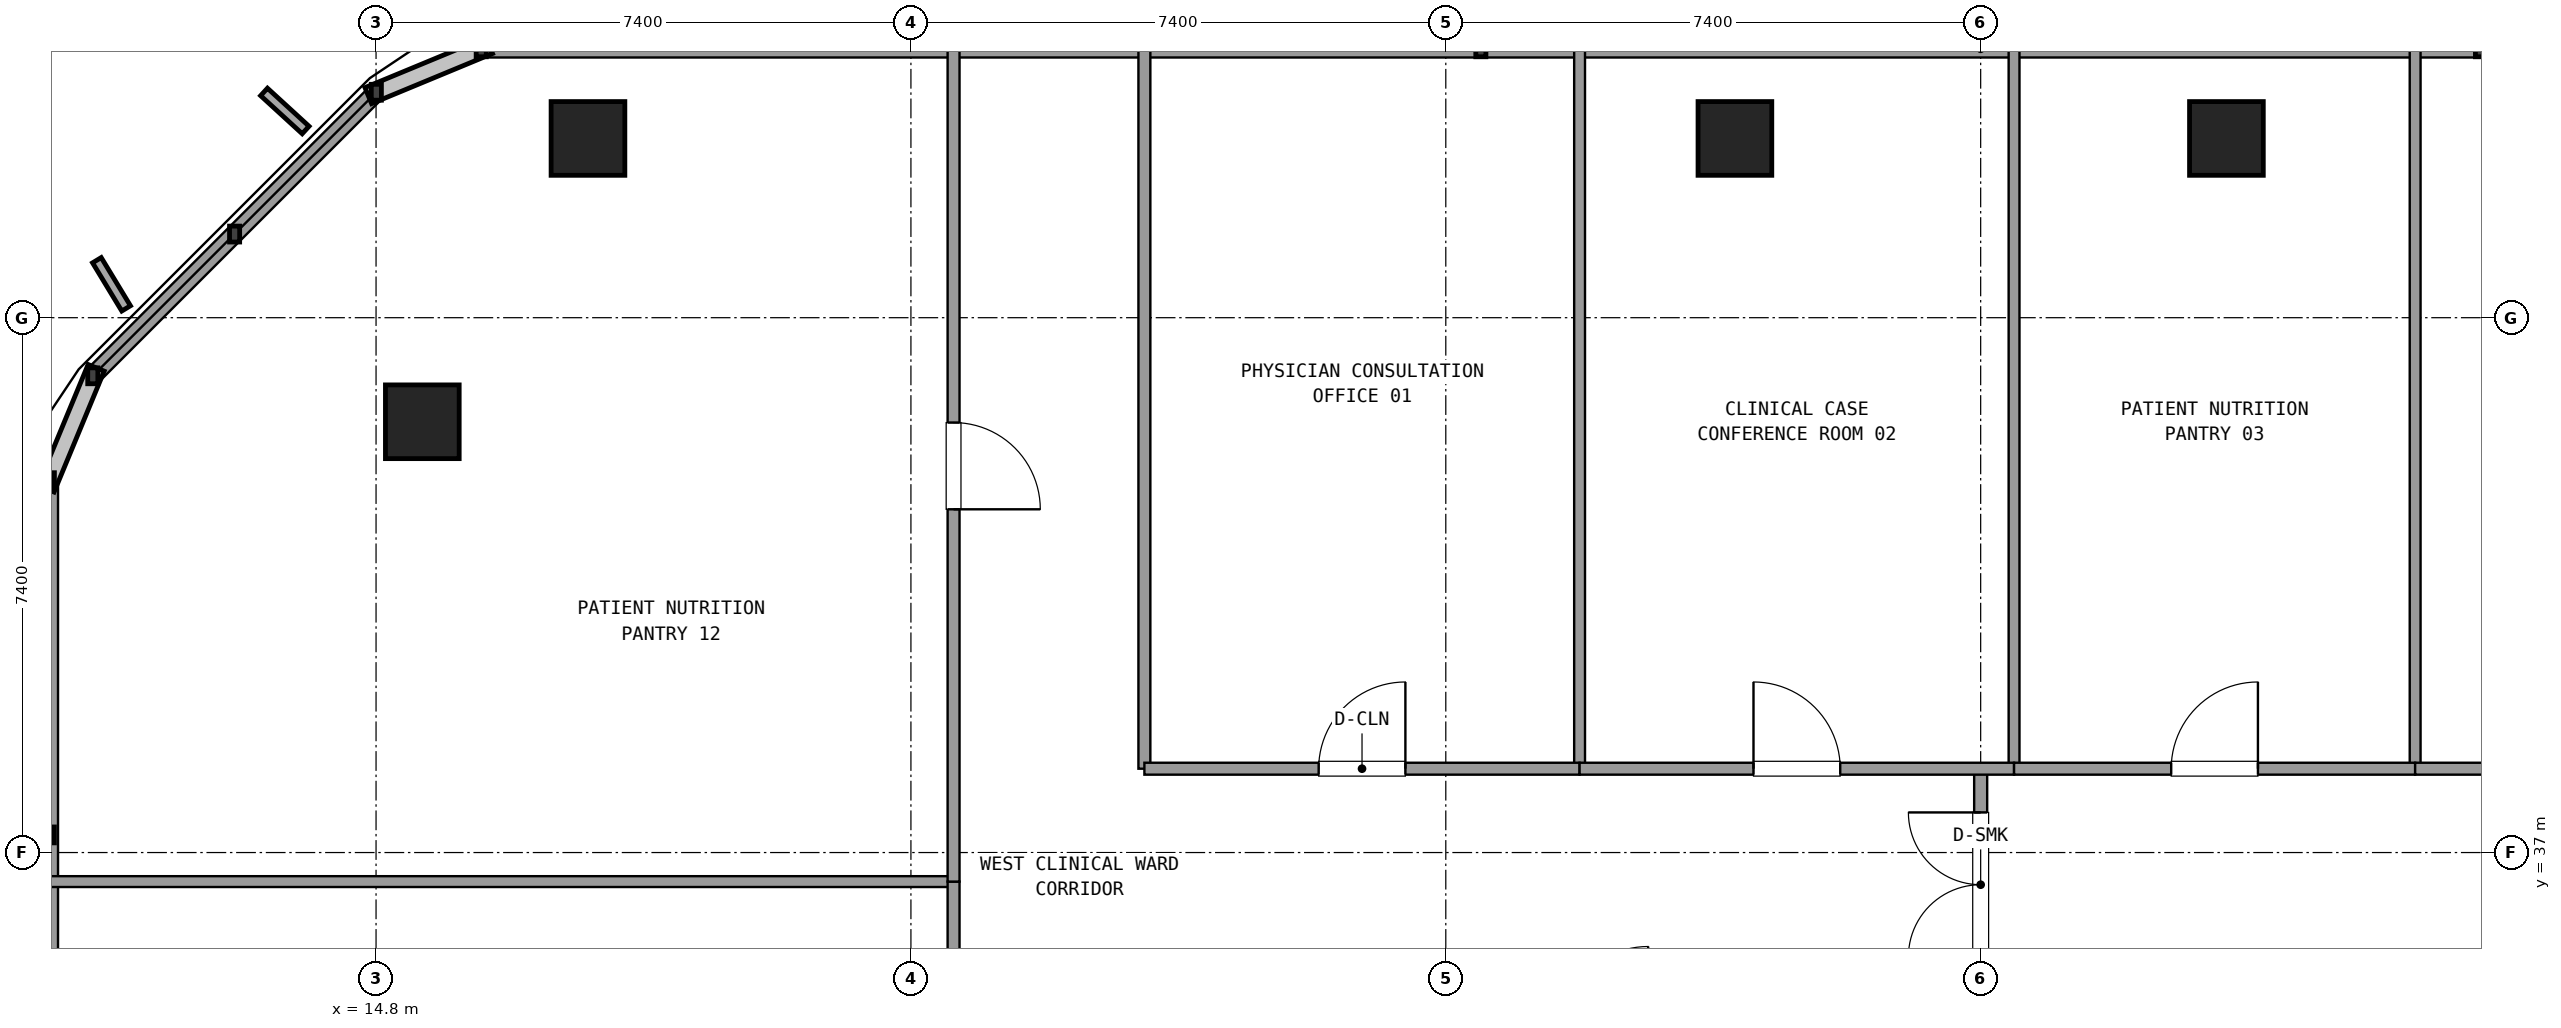
"""IFC4 building model, lengths in metres.
Left out: names, types, materials, properties, quantities, classifications, styles, units other than length and angle.
Written with IfcOpenShell. Run it as: python <this file> out.ifc"""

import sys

from ifc_helpers import new_model, si_unit, direction, frame, frame_2d, origin, origin_2d, place, context, subcontext, project, spatial, rectangle, extrude, element, fill, save


model = new_model("IFC4")
c1 = context("Model", 3, precision=1e-05, world=origin(), true_north=direction((0.0, 1.0)))
c2 = subcontext(c1, "Body", "Model", "MODEL_VIEW")
j1 = project(units=[si_unit("LENGTHUNIT", "METRE"), si_unit("PLANEANGLEUNIT", "RADIAN")], contexts=[c1])
p1 = place(None, origin())
s1 = spatial("IfcSite", under=j1, at=p1, CompositionType="ELEMENT")
p2 = place(p1, origin())
s2 = spatial("IfcBuilding", under=s1, at=p2, CompositionType="ELEMENT")
p3 = place(p2, frame((0.0, 0.0, 84.78)))
s3 = spatial("IfcBuildingStorey", under=s2, at=p3, CompositionType="ELEMENT", Elevation=84.78)
for number, where, z_axis, x_axis in (
    (1, (40.4, 46.88, 0.0), (0.0, 0.0, 1.0), (1.0, 0.0, 0.0)),
    (2, (33.6, 46.88, 0.0), (0.0, 0.0, 1.0), (1.0, 0.0, 0.0)),
):
    element("IfcColumn", number, at=place(p3, frame(where, z_axis=z_axis, x_axis=x_axis)), inside=s3, PredefinedType="COLUMN", context=c2, shape_type="SweptSolid", body=[
        extrude(rectangle(XDim=1.02, YDim=1.02, at=origin_2d()), origin(), (0.0, 0.0, 1.0), 3.579),
    ])
for number, where, z_axis, x_axis in (
    (3, (17.732, 46.88, 0.0), (0.0, 0.0, 1.0), (1.0, 0.0, 0.0)),
    (4, (15.44, 42.96, 0.0), (0.0, 0.0, 1.0), (1.0, 0.0, 0.0)),
):
    element("IfcColumn", number, at=place(p3, frame(where, z_axis=z_axis, x_axis=x_axis)), inside=s3, PredefinedType="COLUMN", context=c2, shape_type="SweptSolid", body=[
        extrude(rectangle(XDim=1.02, YDim=1.02, at=origin_2d()), origin(), (0.0, 0.0, 1.0), 3.577),
    ])
p4 = place(p3, frame((57.745, 48.12, 0.0), z_axis=(0.0, 0.0, 1.0), x_axis=(-1.0, 0.0, 0.0)))
e5 = element("IfcWall", 5, at=p4, inside=s3, PredefinedType="SOLIDWALL", context=c2, shape_type="SweptSolid", body=[
    extrude(rectangle(XDim=41.49, YDim=0.24, at=frame_2d((20.745, 0.0))), origin(), (0.0, 0.0, 1.0), 0.85),
])
p5 = place(p3, frame((14.804, 47.519, 0.0), z_axis=(0.0, 0.0, 1.0), x_axis=(-0.707084777957, -0.707128783731, 0.0)))
e6 = element("IfcWall", 6, at=p5, inside=s3, PredefinedType="SOLIDWALL", context=c2, shape_type="SweptSolid", body=[
    extrude(rectangle(XDim=5.548, YDim=0.24, at=frame_2d((2.774, 0.0))), origin(), (0.0, 0.0, 1.0), 0.85),
])
p6 = place(p3, frame((10.28, 42.145, 0.0), z_axis=(0.0, 0.0, 1.0), x_axis=(0.0, -1.0, 0.0)))
e7 = element("IfcWall", 7, at=p6, inside=s3, PredefinedType="SOLIDWALL", context=c2, shape_type="SweptSolid", body=[
    extrude(rectangle(XDim=14.704, YDim=0.24, at=frame_2d((7.352, 0.0))), origin(), (0.0, 0.0, 1.0), 0.85),
])
p7 = place(p3, frame((37.0, 34.95, 0.0), z_axis=(0.0, 0.0, 1.0), x_axis=(0.0, 1.0, 0.0)))
e8 = element("IfcWall", 8, at=p7, inside=s3, PredefinedType="PARTITIONING", context=c2, shape_type="SweptSolid", body=[
    extrude(rectangle(XDim=3.21, YDim=0.18, at=frame_2d((1.605, 0.0))), origin(), (0.0, 0.0, 1.0), 2.61),
])
p8 = place(p7, frame((0.605, 0.0, 0.0)))
e9 = element("IfcOpeningElement", 9, at=p8, cuts=e8, PredefinedType="OPENING", context=c2, shape_type="SweptSolid", body=[
    extrude(rectangle(XDim=2.0, YDim=2.2, at=frame_2d((1.0, 1.1))), frame((0.0, 0.1, 0.0), z_axis=(0.0, -1.0, 0.0), x_axis=(1.0, 0.0, 0.0)), (0.0, 0.0, 1.0), 0.2),
])
p9 = place(p3, frame((25.43, 38.16, 0.0), z_axis=(0.0, 0.0, 1.0), x_axis=(0.0, 1.0, 0.0)))
e10 = element("IfcWall", 10, at=p9, inside=s3, PredefinedType="PARTITIONING", context=c2, shape_type="SweptSolid", body=[
    extrude(rectangle(XDim=9.94, YDim=0.165, at=frame_2d((4.97, 0.0))), origin(), (0.0, 0.0, 1.0), 2.61),
])
p10 = place(p3, frame((31.451, 38.16, 0.0), z_axis=(0.0, 0.0, 1.0), x_axis=(0.0, 1.0, 0.0)))
e11 = element("IfcWall", 11, at=p10, inside=s3, PredefinedType="PARTITIONING", context=c2, shape_type="SweptSolid", body=[
    extrude(rectangle(XDim=9.94, YDim=0.15, at=frame_2d((4.97, 0.0))), origin(), (0.0, 0.0, 1.0), 2.61),
])
p11 = place(p3, frame((25.43, 38.16, 0.0), z_axis=(0.0, 0.0, 1.0), x_axis=(1.0, 0.0, 0.0)))
e12 = element("IfcWall", 12, at=p11, inside=s3, PredefinedType="PARTITIONING", context=c2, shape_type="SweptSolid", body=[
    extrude(rectangle(XDim=6.021, YDim=0.165, at=frame_2d((3.01, 0.0))), origin(), (0.0, 0.0, 1.0), 2.61),
])
p12 = place(p11, frame((2.411, 0.0, 0.0)))
e13 = element("IfcOpeningElement", 13, at=p12, cuts=e12, PredefinedType="OPENING", context=c2, shape_type="SweptSolid", body=[
    extrude(rectangle(XDim=1.2, YDim=2.15, at=frame_2d((0.6, 1.075))), frame((0.0, 0.093, 0.0), z_axis=(0.0, -1.0, 0.0), x_axis=(1.0, 0.0, 0.0)), (0.0, 0.0, 1.0), 0.185),
])
p13 = place(p3, frame((37.462, 38.16, 0.0), z_axis=(0.0, 0.0, 1.0), x_axis=(0.0, 1.0, 0.0)))
e14 = element("IfcWall", 14, at=p13, inside=s3, PredefinedType="PARTITIONING", context=c2, shape_type="SweptSolid", body=[
    extrude(rectangle(XDim=9.94, YDim=0.15, at=frame_2d((4.97, 0.0))), origin(), (0.0, 0.0, 1.0), 2.61),
])
p14 = place(p3, frame((31.451, 38.16, 0.0), z_axis=(0.0, 0.0, 1.0), x_axis=(1.0, 0.0, 0.0)))
e15 = element("IfcWall", 15, at=p14, inside=s3, PredefinedType="PARTITIONING", context=c2, shape_type="SweptSolid", body=[
    extrude(rectangle(XDim=6.011, YDim=0.165, at=frame_2d((3.005, 0.0))), origin(), (0.0, 0.0, 1.0), 2.61),
])
p15 = place(p14, frame((2.406, 0.0, 0.0)))
e16 = element("IfcOpeningElement", 16, at=p15, cuts=e15, PredefinedType="OPENING", context=c2, shape_type="SweptSolid", body=[
    extrude(rectangle(XDim=1.2, YDim=2.15, at=frame_2d((0.6, 1.075))), frame((0.0, 0.093, 0.0), z_axis=(0.0, -1.0, 0.0), x_axis=(1.0, 0.0, 0.0)), (0.0, 0.0, 1.0), 0.185),
])
p16 = place(p3, frame((43.011, 38.16, 0.0), z_axis=(0.0, 0.0, 1.0), x_axis=(0.0, 1.0, 0.0)))
e17 = element("IfcWall", 17, at=p16, inside=s3, PredefinedType="PARTITIONING", context=c2, shape_type="SweptSolid", body=[
    extrude(rectangle(XDim=9.94, YDim=0.15, at=frame_2d((4.97, 0.0))), origin(), (0.0, 0.0, 1.0), 2.61),
])
p17 = place(p3, frame((37.462, 38.16, 0.0), z_axis=(0.0, 0.0, 1.0), x_axis=(1.0, 0.0, 0.0)))
e18 = element("IfcWall", 18, at=p17, inside=s3, PredefinedType="PARTITIONING", context=c2, shape_type="SweptSolid", body=[
    extrude(rectangle(XDim=5.549, YDim=0.165, at=frame_2d((2.774, 0.0))), origin(), (0.0, 0.0, 1.0), 2.61),
])
p18 = place(p17, frame((2.174, 0.0, 0.0)))
e19 = element("IfcOpeningElement", 19, at=p18, cuts=e18, PredefinedType="OPENING", context=c2, shape_type="SweptSolid", body=[
    extrude(rectangle(XDim=1.2, YDim=2.15, at=frame_2d((0.6, 1.075))), frame((0.0, 0.093, 0.0), z_axis=(0.0, -1.0, 0.0), x_axis=(1.0, 0.0, 0.0)), (0.0, 0.0, 1.0), 0.185),
])
p19 = place(p3, frame((43.011, 38.16, 0.0), z_axis=(0.0, 0.0, 1.0), x_axis=(1.0, 0.0, 0.0)))
e20 = element("IfcWall", 20, at=p19, inside=s3, PredefinedType="PARTITIONING", context=c2, shape_type="SweptSolid", body=[
    extrude(rectangle(XDim=5.559, YDim=0.165, at=frame_2d((2.78, 0.0))), origin(), (0.0, 0.0, 1.0), 2.61),
])
p20 = place(p19, frame((2.179, 0.0, 0.0)))
e21 = element("IfcOpeningElement", 21, at=p20, cuts=e20, PredefinedType="OPENING", context=c2, shape_type="SweptSolid", body=[
    extrude(rectangle(XDim=1.2, YDim=2.15, at=frame_2d((0.6, 1.075))), frame((0.0, 0.093, 0.0), z_axis=(0.0, -1.0, 0.0), x_axis=(1.0, 0.0, 0.0)), (0.0, 0.0, 1.0), 0.185),
])
p21 = place(p3, frame((22.79, 36.598, 0.0), z_axis=(0.0, 0.0, 1.0), x_axis=(-1.0, 0.0, 0.0)))
e22 = element("IfcWall", 22, at=p21, inside=s3, PredefinedType="PARTITIONING", context=c2, shape_type="SweptSolid", body=[
    extrude(rectangle(XDim=12.49, YDim=0.15, at=frame_2d((6.245, 0.0))), origin(), (0.0, 0.0, 1.0), 2.61),
])
p22 = place(p3, frame((22.79, 27.56, 0.0), z_axis=(0.0, 0.0, 1.0), x_axis=(0.0, 1.0, 0.0)))
e23 = element("IfcWall", 23, at=p22, inside=s3, PredefinedType="PARTITIONING", context=c2, shape_type="SweptSolid", body=[
    extrude(rectangle(XDim=9.038, YDim=0.165, at=frame_2d((4.519, 0.0))), origin(), (0.0, 0.0, 1.0), 2.61),
])
p23 = place(p22, frame((3.919, 0.0, 0.0)))
e24 = element("IfcOpeningElement", 24, at=p23, cuts=e23, PredefinedType="OPENING", context=c2, shape_type="SweptSolid", body=[
    extrude(rectangle(XDim=1.2, YDim=2.15, at=frame_2d((0.6, 1.075))), frame((0.0, 0.093, 0.0), z_axis=(0.0, -1.0, 0.0), x_axis=(1.0, 0.0, 0.0)), (0.0, 0.0, 1.0), 0.185),
])
p24 = place(p3, frame((22.79, 36.598, 0.0), z_axis=(0.0, 0.0, 1.0), x_axis=(0.0, 1.0, 0.0)))
e25 = element("IfcWall", 25, at=p24, inside=s3, PredefinedType="PARTITIONING", context=c2, shape_type="SweptSolid", body=[
    extrude(rectangle(XDim=11.502, YDim=0.165, at=frame_2d((5.751, 0.0))), origin(), (0.0, 0.0, 1.0), 2.61),
])
p25 = place(p24, frame((5.151, 0.0, 0.0)))
e26 = element("IfcOpeningElement", 26, at=p25, cuts=e25, PredefinedType="OPENING", context=c2, shape_type="SweptSolid", body=[
    extrude(rectangle(XDim=1.2, YDim=2.15, at=frame_2d((0.6, 1.075))), frame((0.0, 0.093, 0.0), z_axis=(0.0, -1.0, 0.0), x_axis=(1.0, 0.0, 0.0)), (0.0, 0.0, 1.0), 0.185),
])
p26 = place(p8, origin())
e27 = element("IfcDoor", 27, at=p26, inside=s3, OperationType="DOUBLE_DOOR_SINGLE_SWING", PredefinedType="DOOR", context=c2, shape_type="SweptSolid", body=[
    extrude(rectangle(XDim=2.0, YDim=2.2, at=frame_2d((1.0, 1.1))), frame((0.0, 0.025, 0.0), z_axis=(0.0, -1.0, 0.0), x_axis=(1.0, 0.0, 0.0)), (0.0, 0.0, 1.0), 0.05),
])
fill(e9, e27)
p27 = place(p12, origin())
e28 = element("IfcDoor", 28, at=p27, inside=s3, OperationType="SINGLE_SWING_RIGHT", PredefinedType="DOOR", context=c2, shape_type="SweptSolid", body=[
    extrude(rectangle(XDim=1.2, YDim=2.15, at=frame_2d((0.6, 1.075))), frame((0.0, 0.025, 0.0), z_axis=(0.0, -1.0, 0.0), x_axis=(1.0, 0.0, 0.0)), (0.0, 0.0, 1.0), 0.05),
])
fill(e13, e28)
p28 = place(p15, origin())
e29 = element("IfcDoor", 29, at=p28, inside=s3, OperationType="SINGLE_SWING_LEFT", PredefinedType="DOOR", context=c2, shape_type="SweptSolid", body=[
    extrude(rectangle(XDim=1.2, YDim=2.15, at=frame_2d((0.6, 1.075))), frame((0.0, 0.025, 0.0), z_axis=(0.0, -1.0, 0.0), x_axis=(1.0, 0.0, 0.0)), (0.0, 0.0, 1.0), 0.05),
])
fill(e16, e29)
p29 = place(p18, origin())
e30 = element("IfcDoor", 30, at=p29, inside=s3, OperationType="SINGLE_SWING_RIGHT", PredefinedType="DOOR", context=c2, shape_type="SweptSolid", body=[
    extrude(rectangle(XDim=1.2, YDim=2.15, at=frame_2d((0.6, 1.075))), frame((0.0, 0.025, 0.0), z_axis=(0.0, -1.0, 0.0), x_axis=(1.0, 0.0, 0.0)), (0.0, 0.0, 1.0), 0.05),
])
fill(e19, e30)
p30 = place(p25, frame((1.2, 0.0, 0.0), z_axis=(0.0, 0.0, 1.0), x_axis=(-1.0, 0.0, 0.0)))
e31 = element("IfcDoor", 31, at=p30, inside=s3, OperationType="SINGLE_SWING_LEFT", PredefinedType="DOOR", context=c2, shape_type="SweptSolid", body=[
    extrude(rectangle(XDim=1.2, YDim=2.15, at=frame_2d((0.6, 1.075))), frame((0.0, 0.025, 0.0), z_axis=(0.0, -1.0, 0.0), x_axis=(1.0, 0.0, 0.0)), (0.0, 0.0, 1.0), 0.05),
])
fill(e26, e31)
save(model, sys.argv[1])
